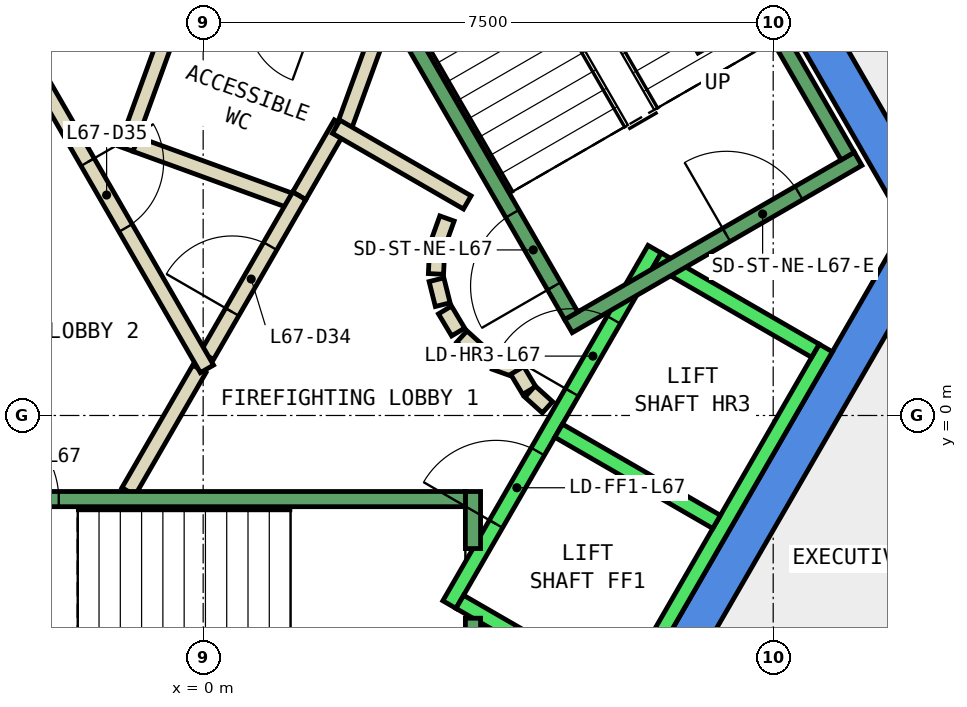
"""IFC4 building model, lengths in metres.
Left out: names, types, materials, properties, quantities, classifications, styles, units other than length and angle.
Written with IfcOpenShell. Run it as: python <this file> out.ifc"""

import sys

from ifc_helpers import new_model, si_unit, direction, frame, frame_2d, origin, place, context, subcontext, project, spatial, polyline, rectangle, outline, extrude, element, fill, save


model = new_model("IFC4")
c1 = context("Model", 3, precision=1e-05, world=origin(), true_north=direction((0.0, 1.0)))
c2 = subcontext(c1, "Body", "Model", "MODEL_VIEW")
j1 = project(units=[si_unit("LENGTHUNIT", "METRE"), si_unit("PLANEANGLEUNIT", "RADIAN")], contexts=[c1])
p1 = place(None, origin())
s1 = spatial("IfcSite", under=j1, at=p1, CompositionType="ELEMENT")
p2 = place(p1, origin())
s2 = spatial("IfcBuilding", under=s1, at=p2, CompositionType="ELEMENT")
p3 = place(p2, frame((0.0, 0.0, 290.0)))
s3 = spatial("IfcBuildingStorey", under=s2, at=p3, CompositionType="ELEMENT", Elevation=290.0)
p4 = place(p3, frame((0.0, 0.0, -0.34)))
e1 = element("IfcWall", 1, at=p4, inside=s3, PredefinedType="SHEAR", context=c2, shape_type="SweptSolid", body=[
    extrude(outline(polyline([(5.486, 9.998), (5.053, 9.748), (9.238, 2.5), (9.815, 2.5), (5.486, 9.998)])), origin(), (0.0, 0.0, 1.0), 3.6),
])
p5 = place(p3, frame((0.0, 0.0, -0.34)))
e2 = element("IfcWall", 2, at=p5, inside=s3, PredefinedType="SHEAR", context=c2, shape_type="SweptSolid", body=[
    extrude(outline(polyline([(4.907, -6.0), (9.815, 2.5), (9.238, 2.5), (4.619, -5.5), (4.907, -6.0)])), origin(), (0.0, 0.0, 1.0), 3.6),
])
p6 = place(p3, frame((1.264, 2.89, 0.0), z_axis=(0.0, 0.0, 1.0), x_axis=(0.500043792738, 0.866000118559, 0.0)))
e3 = element("IfcWall", 3, at=p6, inside=s3, PredefinedType="PARTITIONING", context=c2, shape_type="SweptSolid", body=[
    extrude(rectangle(XDim=1.096, YDim=0.2, at=frame_2d((0.548, 0.0))), origin(), (0.0, 0.0, 1.0), 3.26),
])
p7 = place(p3, frame((1.838, 3.748, 0.0), z_axis=(0.0, 0.0, 1.0), x_axis=(0.342266462435, 0.939602931398, 0.0)))
e4 = element("IfcWall", 4, at=p7, inside=s3, PredefinedType="PARTITIONING", context=c2, shape_type="SweptSolid", body=[
    extrude(rectangle(XDim=1.198, YDim=0.2, at=frame_2d((0.599, 0.0))), origin(), (0.0, 0.0, 1.0), 3.26),
])
p8 = place(p3, frame((-0.196, 5.764, 0.0), z_axis=(0.0, 0.0, 1.0), x_axis=(-0.34165322761, -0.939826086073, 0.0)))
e5 = element("IfcWall", 5, at=p8, inside=s3, PredefinedType="PARTITIONING", context=c2, shape_type="SweptSolid", body=[
    extrude(rectangle(XDim=2.4, YDim=0.2, at=frame_2d((1.2, 0.0))), origin(), (0.0, 0.0, 1.0), 3.26),
])
p9 = place(p3, frame((-0.888, 3.568, 0.0), z_axis=(0.0, 0.0, 1.0), x_axis=(0.939685034098, -0.34204098686, 0.0)))
e6 = element("IfcWall", 6, at=p9, inside=s3, PredefinedType="PARTITIONING", context=c2, shape_type="SweptSolid", body=[
    extrude(rectangle(XDim=2.237, YDim=0.2, at=frame_2d((1.119, 0.0))), origin(), (0.0, 0.0, 1.0), 3.26),
])
p10 = place(p3, frame((-0.982, -1.0, 0.0), z_axis=(0.0, 0.0, 1.0), x_axis=(0.50024047865, 0.865886518847, 0.0)))
e7 = element("IfcWall", 7, at=p10, inside=s3, PredefinedType="PARTITIONING", context=c2, shape_type="SweptSolid", body=[
    extrude(rectangle(XDim=1.863, YDim=0.2, at=frame_2d((0.931, 0.0))), origin(), (0.0, 0.0, 1.0), 3.26),
])
p11 = place(p3, frame((0.05, 0.787, 0.0), z_axis=(0.0, 0.0, 1.0), x_axis=(0.499945861543, 0.866056658381, 0.0)))
e8 = element("IfcWall", 8, at=p11, inside=s3, PredefinedType="PARTITIONING", context=c2, shape_type="SweptSolid", body=[
    extrude(rectangle(XDim=2.428, YDim=0.2, at=frame_2d((1.214, 0.0))), origin(), (0.0, 0.0, 1.0), 3.26),
])
p12 = place(p11, frame((0.664, 0.0, 0.0)))
e9 = element("IfcOpeningElement", 9, at=p12, cuts=e8, PredefinedType="OPENING", context=c2, shape_type="SweptSolid", body=[
    extrude(rectangle(XDim=1.0, YDim=2.1, at=frame_2d((0.5, 1.05))), frame((0.0, 0.11, 0.0), z_axis=(0.0, -1.0, 0.0), x_axis=(1.0, 0.0, 0.0)), (0.0, 0.0, 1.0), 0.22),
])
p13 = place(p3, frame((1.751, 3.798, 0.0), z_axis=(0.0, 0.0, 1.0), x_axis=(0.866091650241, -0.499885240213, 0.0)))
e10 = element("IfcWall", 10, at=p13, inside=s3, PredefinedType="PARTITIONING", context=c2, shape_type="SweptSolid", body=[
    extrude(rectangle(XDim=1.991, YDim=0.2, at=frame_2d((0.995, 0.0))), origin(), (0.0, 0.0, 1.0), 3.26),
])
p14 = place(p3, frame((3.208, 2.592, 0.0), z_axis=(0.0, 0.0, 1.0), x_axis=(-0.337388820924, -0.941365382578, 0.0)))
e11 = element("IfcWall", 11, at=p14, inside=s3, PredefinedType="PARTITIONING", context=c2, shape_type="SweptSolid", body=[
    extrude(rectangle(XDim=0.338, YDim=0.2, at=frame_2d((0.169, 0.0))), origin(), (0.0, 0.0, 1.0), 3.26),
])
p15 = place(p3, frame((3.079, 2.199, 0.0), z_axis=(0.0, 0.0, 1.0), x_axis=(-0.047771483479, -0.998858290933, 0.0)))
e12 = element("IfcWall", 12, at=p15, inside=s3, PredefinedType="PARTITIONING", context=c2, shape_type="SweptSolid", body=[
    extrude(rectangle(XDim=0.337, YDim=0.2, at=frame_2d((0.169, 0.0))), origin(), (0.0, 0.0, 1.0), 3.26),
])
p16 = place(p3, frame((3.07, 1.786, 0.0), z_axis=(0.0, 0.0, 1.0), x_axis=(0.242705583207, -0.970099994784, 0.0)))
e13 = element("IfcWall", 13, at=p16, inside=s3, PredefinedType="PARTITIONING", context=c2, shape_type="SweptSolid", body=[
    extrude(rectangle(XDim=0.338, YDim=0.2, at=frame_2d((0.169, 0.0))), origin(), (0.0, 0.0, 1.0), 3.26),
])
for number, where, z_axis, x_axis in (
    (14, (3.182, 1.388, 0.0), (0.0, 0.0, 1.0), (0.512, -0.859, 0.0)),
    (15, (3.404, 1.039, 0.0), (0.0, 0.0, 1.0), (0.74, -0.672, 0.0)),
):
    element("IfcWall", number, at=place(p3, frame(where, z_axis=z_axis, x_axis=x_axis)), inside=s3, PredefinedType="PARTITIONING", context=c2, shape_type="SweptSolid", body=[
        extrude(rectangle(XDim=0.338, YDim=0.2, at=frame_2d((0.169, 0.0))), origin(), (0.0, 0.0, 1.0), 3.26),
    ])
p17 = place(p3, frame((3.838, 0.702, 0.0), z_axis=(0.0, 0.0, 1.0), x_axis=(0.941035081519, -0.338308993895, 0.0)))
e16 = element("IfcWall", 16, at=p17, inside=s3, PredefinedType="PARTITIONING", context=c2, shape_type="SweptSolid", body=[
    extrude(rectangle(XDim=0.337, YDim=0.2, at=frame_2d((0.168, 0.0))), origin(), (0.0, 0.0, 1.0), 3.26),
])
p18 = place(p3, frame((4.132, 0.593, 0.0), z_axis=(0.0, 0.0, 1.0), x_axis=(0.513561617048, -0.858052717201, 0.0)))
e17 = element("IfcWall", 17, at=p18, inside=s3, PredefinedType="PARTITIONING", context=c2, shape_type="SweptSolid", body=[
    extrude(rectangle(XDim=0.308, YDim=0.2, at=frame_2d((0.154, 0.0))), origin(), (0.0, 0.0, 1.0), 3.26),
])
p19 = place(p3, frame((4.301, 0.315, 0.0), z_axis=(0.0, 0.0, 1.0), x_axis=(0.741798017506, -0.670623367639, 0.0)))
e18 = element("IfcWall", 18, at=p19, inside=s3, PredefinedType="PARTITIONING", context=c2, shape_type="SweptSolid", body=[
    extrude(rectangle(XDim=0.309, YDim=0.2, at=frame_2d((0.154, 0.0))), origin(), (0.0, 0.0, 1.0), 3.26),
])
p20 = place(p3, frame((-2.54, 5.1, 0.0), z_axis=(0.0, 0.0, 1.0), x_axis=(0.499925051871, -0.866068670783, 0.0)))
e19 = element("IfcWall", 19, at=p20, inside=s3, PredefinedType="PARTITIONING", context=c2, shape_type="SweptSolid", body=[
    extrude(rectangle(XDim=5.181, YDim=0.2, at=frame_2d((2.59, 0.0))), origin(), (0.0, 0.0, 1.0), 3.26),
])
p21 = place(p20, frame((2.04, 0.0, 0.0)))
e20 = element("IfcOpeningElement", 20, at=p21, cuts=e19, PredefinedType="OPENING", context=c2, shape_type="SweptSolid", body=[
    extrude(rectangle(XDim=1.0, YDim=2.1, at=frame_2d((0.5, 1.05))), frame((0.0, 0.11, 0.0), z_axis=(0.0, -1.0, 0.0), x_axis=(1.0, 0.0, 0.0)), (0.0, 0.0, 1.0), 0.22),
])
p22 = place(p3, frame((3.24, -2.488, 0.0), z_axis=(0.0, 0.0, 1.0), x_axis=(0.500034260056, 0.866005622828, 0.0)))
e21 = element("IfcWall", 21, at=p22, inside=s3, PredefinedType="STANDARD", context=c2, shape_type="SweptSolid", body=[
    extrude(rectangle(XDim=5.399, YDim=0.2, at=frame_2d((2.7, 0.0))), origin(), (0.0, 0.0, 1.0), 3.26),
])
p23 = place(p22, frame((3.225, 0.0, 0.0)))
e22 = element("IfcOpeningElement", 22, at=p23, cuts=e21, PredefinedType="OPENING", context=c2, shape_type="SweptSolid", body=[
    extrude(rectangle(XDim=1.1, YDim=2.1, at=frame_2d((0.55, 1.05))), frame((0.0, 0.11, 0.0), z_axis=(0.0, -1.0, 0.0), x_axis=(1.0, 0.0, 0.0)), (0.0, 0.0, 1.0), 0.22),
])
p24 = place(p22, frame((1.225, 0.0, 0.0)))
e23 = element("IfcOpeningElement", 23, at=p24, cuts=e21, PredefinedType="OPENING", context=c2, shape_type="SweptSolid", body=[
    extrude(rectangle(XDim=1.1, YDim=2.1, at=frame_2d((0.55, 1.05))), frame((0.0, 0.11, 0.0), z_axis=(0.0, -1.0, 0.0), x_axis=(1.0, 0.0, 0.0)), (0.0, 0.0, 1.0), 0.22),
])
p25 = place(p3, frame((5.492, -3.788, 0.0), z_axis=(0.0, 0.0, 1.0), x_axis=(0.500034260056, 0.866005622828, 0.0)))
e24 = element("IfcWall", 24, at=p25, inside=s3, PredefinedType="STANDARD", context=c2, shape_type="SweptSolid", body=[
    extrude(rectangle(XDim=5.399, YDim=0.2, at=frame_2d((2.7, 0.0))), origin(), (0.0, 0.0, 1.0), 3.26),
])
p26 = place(p3, frame((3.377, -2.452, 0.0), z_axis=(0.0, 0.0, 1.0), x_axis=(0.865955154139, -0.50012165622, 0.0)))
e25 = element("IfcWall", 25, at=p26, inside=s3, PredefinedType="STANDARD", context=c2, shape_type="SweptSolid", body=[
    extrude(rectangle(XDim=2.4, YDim=0.2, at=frame_2d((1.2, 0.0))), origin(), (0.0, 0.0, 1.0), 3.26),
])
for number, where, z_axis, x_axis in (
    (26, (4.677, -0.2, 0.0), (0.0, 0.0, 1.0), (0.866, -0.5, 0.0)),
    (27, (5.977, 2.052, 0.0), (0.0, 0.0, 1.0), (0.866, -0.5, 0.0)),
):
    element("IfcWall", number, at=place(p3, frame(where, z_axis=z_axis, x_axis=x_axis)), inside=s3, PredefinedType="STANDARD", context=c2, shape_type="SweptSolid", body=[
        extrude(rectangle(XDim=2.399, YDim=0.2, at=frame_2d((1.2, 0.0))), origin(), (0.0, 0.0, 1.0), 3.26),
    ])
p27 = place(p3, frame((3.55, -2.667, 0.0), z_axis=(0.0, 0.0, 1.0), x_axis=(0.0, -1.0, 0.0)))
e28 = element("IfcWall", 28, at=p27, inside=s3, PredefinedType="STANDARD", context=c2, shape_type="SweptSolid", body=[
    extrude(rectangle(XDim=2.733, YDim=0.2, at=frame_2d((1.366, 0.0))), origin(), (0.0, 0.0, 1.0), 3.26),
])
p28 = place(p3, frame((3.55, -1.0, 0.0), z_axis=(0.0, 0.0, 1.0), x_axis=(0.0, -1.0, 0.0)))
e29 = element("IfcWall", 29, at=p28, inside=s3, PredefinedType="STANDARD", context=c2, shape_type="SweptSolid", body=[
    extrude(rectangle(XDim=0.751, YDim=0.2, at=frame_2d((0.375, 0.0))), origin(), (0.0, 0.0, 1.0), 3.26),
])
p29 = place(p3, frame((-3.45, -1.1, 0.0), z_axis=(0.0, 0.0, 1.0), x_axis=(1.0, 0.0, 0.0)))
e30 = element("IfcWall", 30, at=p29, inside=s3, PredefinedType="STANDARD", context=c2, shape_type="SweptSolid", body=[
    extrude(rectangle(XDim=6.9, YDim=0.2, at=frame_2d((3.45, 0.0))), origin(), (0.0, 0.0, 1.0), 3.26),
])
p30 = place(p29, frame((0.45, 0.0, 0.0)))
e31 = element("IfcOpeningElement", 31, at=p30, cuts=e30, PredefinedType="OPENING", context=c2, shape_type="SweptSolid", body=[
    extrude(rectangle(XDim=1.1, YDim=2.2, at=frame_2d((0.55, 1.1))), frame((0.0, 0.11, 0.0), z_axis=(0.0, -1.0, 0.0), x_axis=(1.0, 0.0, 0.0)), (0.0, 0.0, 1.0), 0.22),
])
p31 = place(p3, frame((4.806, 1.176, 0.0), z_axis=(0.0, 0.0, 1.0), x_axis=(0.866059941101, 0.499940174841, 0.0)))
e32 = element("IfcWall", 32, at=p31, inside=s3, PredefinedType="STANDARD", context=c2, shape_type="SweptSolid", body=[
    extrude(rectangle(XDim=4.4, YDim=0.2, at=frame_2d((2.2, 0.0))), origin(), (0.0, 0.0, 1.0), 3.26),
])
p32 = place(p31, frame((2.4, 0.0, 0.0)))
e33 = element("IfcOpeningElement", 33, at=p32, cuts=e32, PredefinedType="OPENING", context=c2, shape_type="SweptSolid", body=[
    extrude(rectangle(XDim=1.1, YDim=2.2, at=frame_2d((0.55, 1.1))), frame((0.0, 0.11, 0.0), z_axis=(0.0, -1.0, 0.0), x_axis=(1.0, 0.0, 0.0)), (0.0, 0.0, 1.0), 0.22),
])
p33 = place(p3, frame((4.843, 1.312, 0.0), z_axis=(0.0, 0.0, 1.0), x_axis=(-0.499963383562, 0.866046543262, 0.0)))
e34 = element("IfcWall", 34, at=p33, inside=s3, PredefinedType="STANDARD", context=c2, shape_type="SweptSolid", body=[
    extrude(rectangle(XDim=6.9, YDim=0.2, at=frame_2d((3.45, 0.0))), origin(), (0.0, 0.0, 1.0), 3.26),
])
p34 = place(p33, frame((0.45, 0.0, 0.0)))
e35 = element("IfcOpeningElement", 35, at=p34, cuts=e34, PredefinedType="OPENING", context=c2, shape_type="SweptSolid", body=[
    extrude(rectangle(XDim=1.1, YDim=2.2, at=frame_2d((0.55, 1.1))), frame((0.0, 0.11, 0.0), z_axis=(0.0, -1.0, 0.0), x_axis=(1.0, 0.0, 0.0)), (0.0, 0.0, 1.0), 0.22),
])
p35 = place(p3, frame((8.48, 3.412, 0.0), z_axis=(0.0, 0.0, 1.0), x_axis=(-0.499978703459, 0.866037698999, 0.0)))
e36 = element("IfcWall", 36, at=p35, inside=s3, PredefinedType="STANDARD", context=c2, shape_type="SweptSolid", body=[
    extrude(rectangle(XDim=6.9, YDim=0.2, at=frame_2d((3.45, 0.0))), origin(), (0.0, 0.0, 1.0), 3.26),
])
p36 = place(p3, frame((-1.393, 7.288, 0.0), z_axis=(0.0, 0.0, 1.0), x_axis=(-0.499963383562, -0.866046543262, 0.0)))
e37 = element("IfcWall", 37, at=p36, inside=s3, PredefinedType="STANDARD", context=c2, shape_type="SweptSolid", body=[
    extrude(rectangle(XDim=6.9, YDim=0.2, at=frame_2d((3.45, 0.0))), origin(), (0.0, 0.0, 1.0), 3.26),
])
p37 = place(p36, frame((0.45, 0.0, 0.0)))
e38 = element("IfcOpeningElement", 38, at=p37, cuts=e37, PredefinedType="OPENING", context=c2, shape_type="SweptSolid", body=[
    extrude(rectangle(XDim=1.1, YDim=2.2, at=frame_2d((0.55, 1.1))), frame((0.0, 0.11, 0.0), z_axis=(0.0, -1.0, 0.0), x_axis=(1.0, 0.0, 0.0)), (0.0, 0.0, 1.0), 0.22),
])
p38 = place(p12, origin())
e39 = element("IfcDoor", 39, at=p38, inside=s3, OperationType="SINGLE_SWING_RIGHT", PredefinedType="DOOR", context=c2, shape_type="SweptSolid", body=[
    extrude(rectangle(XDim=1.0, YDim=2.1, at=frame_2d((0.5, 1.05))), frame((0.0, 0.025, 0.0), z_axis=(0.0, -1.0, 0.0), x_axis=(1.0, 0.0, 0.0)), (0.0, 0.0, 1.0), 0.05),
])
fill(e9, e39)
p39 = place(p21, origin())
e40 = element("IfcDoor", 40, at=p39, inside=s3, OperationType="SINGLE_SWING_RIGHT", PredefinedType="DOOR", context=c2, shape_type="SweptSolid", body=[
    extrude(rectangle(XDim=1.0, YDim=2.1, at=frame_2d((0.5, 1.05))), frame((0.0, 0.025, 0.0), z_axis=(0.0, -1.0, 0.0), x_axis=(1.0, 0.0, 0.0)), (0.0, 0.0, 1.0), 0.05),
])
fill(e20, e40)
p40 = place(p23, origin())
e41 = element("IfcDoor", 41, at=p40, inside=s3, OperationType="SLIDING_TO_LEFT", PredefinedType="DOOR", context=c2, shape_type="SweptSolid", body=[
    extrude(rectangle(XDim=1.1, YDim=2.1, at=frame_2d((0.55, 1.05))), frame((0.0, 0.025, 0.0), z_axis=(0.0, -1.0, 0.0), x_axis=(1.0, 0.0, 0.0)), (0.0, 0.0, 1.0), 0.05),
])
fill(e22, e41)
p41 = place(p24, origin())
e42 = element("IfcDoor", 42, at=p41, inside=s3, OperationType="SLIDING_TO_LEFT", PredefinedType="DOOR", context=c2, shape_type="SweptSolid", body=[
    extrude(rectangle(XDim=1.1, YDim=2.1, at=frame_2d((0.55, 1.05))), frame((0.0, 0.025, 0.0), z_axis=(0.0, -1.0, 0.0), x_axis=(1.0, 0.0, 0.0)), (0.0, 0.0, 1.0), 0.05),
])
fill(e23, e42)
p42 = place(p30, origin())
e43 = element("IfcDoor", 43, at=p42, inside=s3, OperationType="SINGLE_SWING_LEFT", PredefinedType="DOOR", context=c2, shape_type="SweptSolid", body=[
    extrude(rectangle(XDim=1.1, YDim=2.2, at=frame_2d((0.55, 1.1))), frame((0.0, 0.025, 0.0), z_axis=(0.0, -1.0, 0.0), x_axis=(1.0, 0.0, 0.0)), (0.0, 0.0, 1.0), 0.05),
])
fill(e31, e43)
p43 = place(p34, origin())
e44 = element("IfcDoor", 44, at=p43, inside=s3, OperationType="SINGLE_SWING_LEFT", PredefinedType="DOOR", context=c2, shape_type="SweptSolid", body=[
    extrude(rectangle(XDim=1.1, YDim=2.2, at=frame_2d((0.55, 1.1))), frame((0.0, 0.025, 0.0), z_axis=(0.0, -1.0, 0.0), x_axis=(1.0, 0.0, 0.0)), (0.0, 0.0, 1.0), 0.05),
])
fill(e35, e44)
p44 = place(p32, origin())
e45 = element("IfcDoor", 45, at=p44, inside=s3, OperationType="SINGLE_SWING_LEFT", PredefinedType="DOOR", context=c2, shape_type="SweptSolid", body=[
    extrude(rectangle(XDim=1.1, YDim=2.2, at=frame_2d((0.55, 1.1))), frame((0.0, 0.025, 0.0), z_axis=(0.0, -1.0, 0.0), x_axis=(1.0, 0.0, 0.0)), (0.0, 0.0, 1.0), 0.05),
])
fill(e33, e45)
save(model, sys.argv[1])
